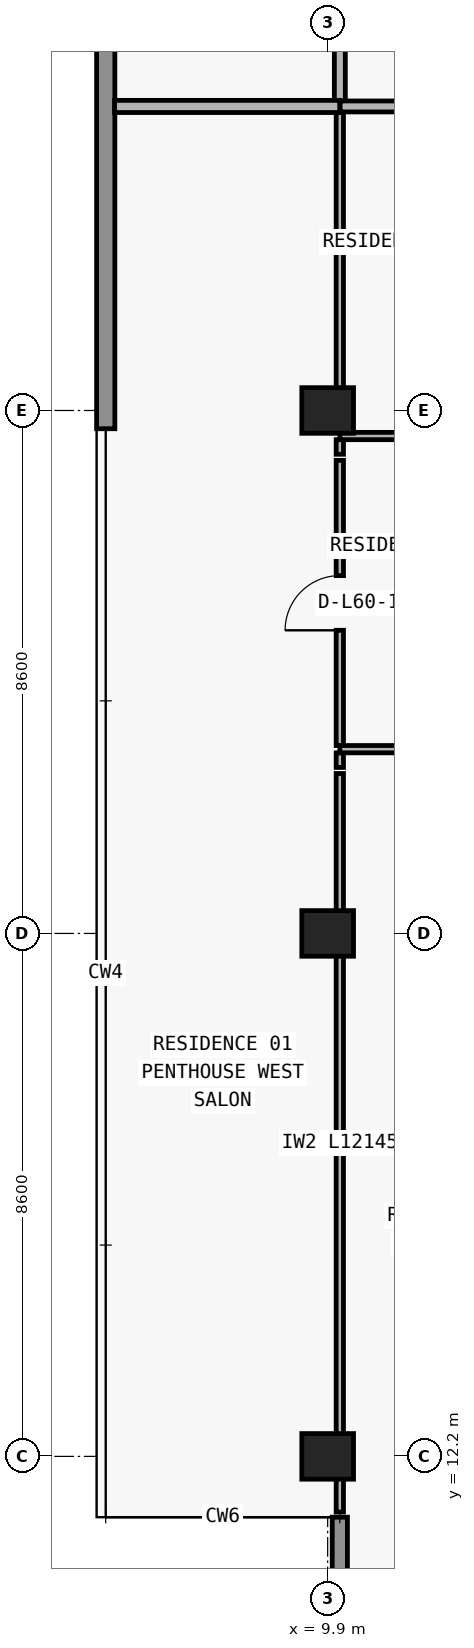
"""IFC4 building model, lengths in metres.
Left out: names, types, materials, properties, quantities, classifications, styles, units other than length and angle.
Written with IfcOpenShell. Run it as: python <this file> out.ifc"""

import sys

from ifc_helpers import new_model, si_unit, direction, frame, frame_2d, origin, origin_2d, place, context, subcontext, project, spatial, rectangle, extrude, element, fill, save


model = new_model("IFC4")
c1 = context("Model", 3, precision=1e-05, world=origin(), true_north=direction((0.0, 1.0)))
c2 = subcontext(c1, "Body", "Model", "MODEL_VIEW")
j1 = project(units=[si_unit("LENGTHUNIT", "METRE"), si_unit("PLANEANGLEUNIT", "RADIAN")], contexts=[c1])
p1 = place(None, origin())
s1 = spatial("IfcSite", under=j1, at=p1, CompositionType="ELEMENT")
p2 = place(p1, origin())
s2 = spatial("IfcBuilding", under=s1, at=p2, CompositionType="ELEMENT")
p3 = place(p2, frame((0.0, 0.0, 214.8)))
s3 = spatial("IfcBuildingStorey", under=s2, at=p3, CompositionType="ELEMENT", Elevation=214.8)
for number, where, z_axis, x_axis in (
    (1, (9.9, 12.2, 0.0), (0.0, 0.0, 1.0), (1.0, 0.0, 0.0)),
    (2, (9.9, 20.8, 0.0), (0.0, 0.0, 1.0), (1.0, 0.0, 0.0)),
    (3, (9.9, 29.4, 0.0), (0.0, 0.0, 1.0), (1.0, 0.0, 0.0)),
):
    element("IfcColumn", number, at=place(p3, frame(where, z_axis=z_axis, x_axis=x_axis)), inside=s3, PredefinedType="COLUMN", context=c2, shape_type="SweptSolid", body=[
        extrude(rectangle(XDim=0.85, YDim=0.75, at=origin_2d()), origin(), (0.0, 0.0, 1.0), 3.05),
    ])
p4 = place(p3, frame((10.1, 11.2, 0.0), z_axis=(0.0, 0.0, 1.0), x_axis=(0.0, -1.0, 0.0)))
e4 = element("IfcWall", 4, at=p4, inside=s3, PredefinedType="ELEMENTEDWALL", context=c2, shape_type="SweptSolid", body=[
    extrude(rectangle(XDim=3.45, YDim=0.25, at=frame_2d((1.725, 0.0))), origin(), (0.0, 0.0, 1.0), 3.05),
])
p5 = place(p3, frame((6.25, 29.1, 0.0), z_axis=(0.0, 0.0, 1.0), x_axis=(0.0, 1.0, 0.0)))
e5 = element("IfcWall", 5, at=p5, inside=s3, PredefinedType="STANDARD", context=c2, shape_type="SweptSolid", body=[
    extrude(rectangle(XDim=17.9, YDim=0.3, at=frame_2d((8.95, 0.0))), origin(), (0.0, 0.0, 1.0), 3.05),
])
p6 = place(p3, frame((10.1, 11.285, 0.0), z_axis=(0.0, 0.0, 1.0), x_axis=(0.0, 1.0, 0.0)))
e6 = element("IfcWall", 6, at=p6, inside=s3, PredefinedType="PARTITIONING", context=c2, shape_type="SweptSolid", body=[
    extrude(rectangle(XDim=12.145, YDim=0.12, at=frame_2d((6.073, 0.0))), origin(), (0.0, 0.0, 1.0), 2.263),
])
p7 = place(p3, frame((10.1, 23.53, 0.0), z_axis=(0.0, 0.0, 1.0), x_axis=(0.0, 1.0, 0.0)))
e7 = element("IfcWall", 7, at=p7, inside=s3, PredefinedType="PARTITIONING", context=c2, shape_type="SweptSolid", body=[
    extrude(rectangle(XDim=0.24, YDim=0.12, at=frame_2d((0.12, 0.0))), origin(), (0.0, 0.0, 1.0), 2.263),
])
p8 = place(p3, frame((10.1, 23.89, 0.0), z_axis=(0.0, 0.0, 1.0), x_axis=(0.0, 1.0, 0.0)))
e8 = element("IfcWall", 8, at=p8, inside=s3, PredefinedType="PARTITIONING", context=c2, shape_type="SweptSolid", body=[
    extrude(rectangle(XDim=4.69, YDim=0.12, at=frame_2d((2.345, 0.0))), origin(), (0.0, 0.0, 1.0), 2.263),
])
p9 = place(p8, frame((1.895, 0.0, 0.0)))
e9 = element("IfcOpeningElement", 9, at=p9, cuts=e8, PredefinedType="OPENING", context=c2, shape_type="SweptSolid", body=[
    extrude(rectangle(XDim=0.9, YDim=2.15, at=frame_2d((0.45, 1.075))), frame((0.0, 0.07, 0.0), z_axis=(0.0, -1.0, 0.0), x_axis=(1.0, 0.0, 0.0)), (0.0, 0.0, 1.0), 0.14),
])
p10 = place(p3, frame((10.1, 28.68, 0.0), z_axis=(0.0, 0.0, 1.0), x_axis=(0.0, 1.0, 0.0)))
e10 = element("IfcWall", 10, at=p10, inside=s3, PredefinedType="PARTITIONING", context=c2, shape_type="SweptSolid", body=[
    extrude(rectangle(XDim=0.24, YDim=0.12, at=frame_2d((0.12, 0.0))), origin(), (0.0, 0.0, 1.0), 2.263),
])
p11 = place(p3, frame((10.1, 29.1, 0.0), z_axis=(0.0, 0.0, 1.0), x_axis=(0.0, 1.0, 0.0)))
e11 = element("IfcWall", 11, at=p11, inside=s3, PredefinedType="PARTITIONING", context=c2, shape_type="SweptSolid", body=[
    extrude(rectangle(XDim=5.3, YDim=0.12, at=frame_2d((2.65, 0.0))), origin(), (0.0, 0.0, 1.0), 2.263),
])
p12 = place(p3, frame((10.1, 34.405, 0.0), z_axis=(0.0, 0.0, 1.0), x_axis=(0.0, 1.0, 0.0)))
e12 = element("IfcWall", 12, at=p12, inside=s3, PredefinedType="PARTITIONING", context=c2, shape_type="SweptSolid", body=[
    extrude(rectangle(XDim=2.595, YDim=0.18, at=frame_2d((1.297, 0.0))), origin(), (0.0, 0.0, 1.0), 2.263),
])
p13 = place(p3, frame((10.1, 23.83, 0.0), z_axis=(0.0, 0.0, 1.0), x_axis=(1.0, 0.0, 0.0)))
e13 = element("IfcWall", 13, at=p13, inside=s3, PredefinedType="PARTITIONING", context=c2, shape_type="SweptSolid", body=[
    extrude(rectangle(XDim=8.2, YDim=0.12, at=frame_2d((4.1, 0.0))), origin(), (0.0, 0.0, 1.0), 3.05),
])
p14 = place(p13, frame((1.477, 0.0, 0.0)))
e14 = element("IfcOpeningElement", 14, at=p14, cuts=e13, PredefinedType="OPENING", context=c2, shape_type="SweptSolid", body=[
    extrude(rectangle(XDim=0.9, YDim=2.15, at=frame_2d((0.45, 1.075))), frame((0.0, 0.07, 0.0), z_axis=(0.0, -1.0, 0.0), x_axis=(1.0, 0.0, 0.0)), (0.0, 0.0, 1.0), 0.14),
])
p15 = place(p13, frame((5.864, 0.0, 0.0)))
e15 = element("IfcOpeningElement", 15, at=p15, cuts=e13, PredefinedType="OPENING", context=c2, shape_type="SweptSolid", body=[
    extrude(rectangle(XDim=0.9, YDim=2.15, at=frame_2d((0.45, 1.075))), frame((0.0, 0.07, 0.0), z_axis=(0.0, -1.0, 0.0), x_axis=(1.0, 0.0, 0.0)), (0.0, 0.0, 1.0), 0.14),
])
p16 = place(p3, frame((10.1, 28.98, 0.0), z_axis=(0.0, 0.0, 1.0), x_axis=(1.0, 0.0, 0.0)))
e16 = element("IfcWall", 16, at=p16, inside=s3, PredefinedType="PARTITIONING", context=c2, shape_type="SweptSolid", body=[
    extrude(rectangle(XDim=8.2, YDim=0.12, at=frame_2d((4.1, 0.0))), origin(), (0.0, 0.0, 1.0), 3.05),
])
p17 = place(p16, frame((1.764, 0.0, 0.0)))
e17 = element("IfcOpeningElement", 17, at=p17, cuts=e16, PredefinedType="OPENING", context=c2, shape_type="SweptSolid", body=[
    extrude(rectangle(XDim=0.9, YDim=2.15, at=frame_2d((0.45, 1.075))), frame((0.0, 0.07, 0.0), z_axis=(0.0, -1.0, 0.0), x_axis=(1.0, 0.0, 0.0)), (0.0, 0.0, 1.0), 0.14),
])
p18 = place(p3, frame((6.395, 34.4, 0.0), z_axis=(0.0, 0.0, 1.0), x_axis=(1.0, 0.0, 0.0)))
e18 = element("IfcWall", 18, at=p18, inside=s3, PredefinedType="PARTITIONING", context=c2, shape_type="SweptSolid", body=[
    extrude(rectangle(XDim=3.705, YDim=0.2, at=frame_2d((1.853, 0.0))), origin(), (0.0, 0.0, 1.0), 3.05),
])
p19 = place(p3, frame((10.105, 34.4, 0.0), z_axis=(0.0, 0.0, 1.0), x_axis=(1.0, 0.0, 0.0)))
e19 = element("IfcWall", 19, at=p19, inside=s3, PredefinedType="PARTITIONING", context=c2, shape_type="SweptSolid", body=[
    extrude(rectangle(XDim=29.099, YDim=0.18, at=frame_2d((14.55, 0.0))), origin(), (0.0, 0.0, 1.0), 3.05),
])
p20 = place(p19, frame((2.647, 0.0, 0.0)))
e20 = element("IfcOpeningElement", 20, at=p20, cuts=e19, PredefinedType="OPENING", context=c2, shape_type="SweptSolid", body=[
    extrude(rectangle(XDim=1.0, YDim=2.2, at=frame_2d((0.5, 1.1))), frame((0.0, 0.1, 0.0), z_axis=(0.0, -1.0, 0.0), x_axis=(1.0, 0.0, 0.0)), (0.0, 0.0, 1.0), 0.2),
])
p21 = place(p19, frame((11.056, 0.0, 0.0)))
e21 = element("IfcOpeningElement", 21, at=p21, cuts=e19, PredefinedType="OPENING", context=c2, shape_type="SweptSolid", body=[
    extrude(rectangle(XDim=1.0, YDim=2.2, at=frame_2d((0.5, 1.1))), frame((0.0, 0.1, 0.0), z_axis=(0.0, -1.0, 0.0), x_axis=(1.0, 0.0, 0.0)), (0.0, 0.0, 1.0), 0.2),
])
p22 = place(p19, frame((19.334, 0.0, 0.0)))
e22 = element("IfcOpeningElement", 22, at=p22, cuts=e19, PredefinedType="OPENING", context=c2, shape_type="SweptSolid", body=[
    extrude(rectangle(XDim=1.0, YDim=2.2, at=frame_2d((0.5, 1.1))), frame((0.0, 0.1, 0.0), z_axis=(0.0, -1.0, 0.0), x_axis=(1.0, 0.0, 0.0)), (0.0, 0.0, 1.0), 0.2),
])
p23 = place(p19, frame((26.547, 0.0, 0.0)))
e23 = element("IfcOpeningElement", 23, at=p23, cuts=e19, PredefinedType="OPENING", context=c2, shape_type="SweptSolid", body=[
    extrude(rectangle(XDim=1.0, YDim=2.2, at=frame_2d((0.5, 1.1))), frame((0.0, 0.1, 0.0), z_axis=(0.0, -1.0, 0.0), x_axis=(1.0, 0.0, 0.0)), (0.0, 0.0, 1.0), 0.2),
])
p24 = place(p9, origin())
e24 = element("IfcDoor", 24, at=p24, inside=s3, OperationType="SINGLE_SWING_LEFT", PredefinedType="DOOR", context=c2, shape_type="SweptSolid", body=[
    extrude(rectangle(XDim=0.9, YDim=2.15, at=frame_2d((0.45, 1.075))), frame((0.0, 0.025, 0.0), z_axis=(0.0, -1.0, 0.0), x_axis=(1.0, 0.0, 0.0)), (0.0, 0.0, 1.0), 0.05),
])
fill(e9, e24)
save(model, sys.argv[1])
